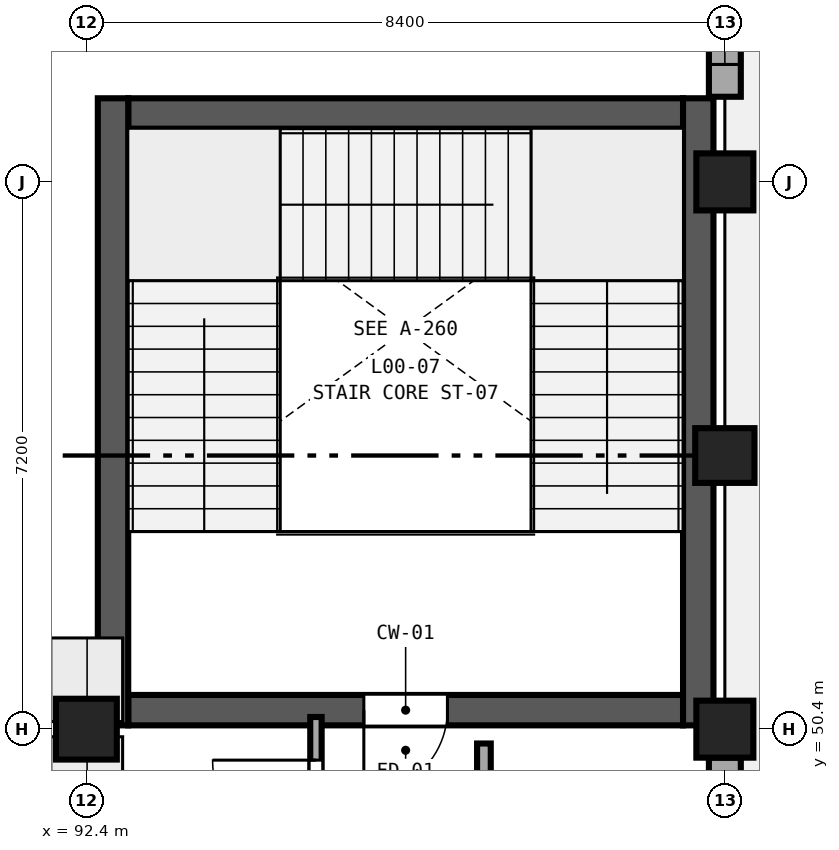
"""IFC4 building model, lengths in metres.
Left out: names, types, materials, properties, quantities, classifications, styles, units other than length and angle.
Written with IfcOpenShell. Run it as: python <this file> out.ifc"""

import sys

from ifc_helpers import new_model, si_unit, direction, frame, frame_2d, origin, origin_2d, place, context, subcontext, project, spatial, rectangle, circle, extrude, element, fill, save


model = new_model("IFC4")
c1 = context("Model", 3, precision=1e-05, world=origin(), true_north=direction((0.0, 1.0)))
c2 = subcontext(c1, "Body", "Model", "MODEL_VIEW")
j1 = project(units=[si_unit("LENGTHUNIT", "METRE"), si_unit("PLANEANGLEUNIT", "RADIAN")], contexts=[c1])
p1 = place(None, origin())
s1 = spatial("IfcSite", under=j1, at=p1, CompositionType="ELEMENT")
p2 = place(p1, origin())
s2 = spatial("IfcBuilding", under=s1, at=p2, CompositionType="ELEMENT")
p3 = place(p2, origin())
s3 = spatial("IfcBuildingStorey", under=s2, at=p3, CompositionType="ELEMENT", Elevation=0.0)
for number, where, z_axis, x_axis in (
    (1, (100.8, 50.4, 0.0), (0.0, 0.0, 1.0), (1.0, 0.0, 0.0)),
    (2, (100.8, 57.6, 0.0), (0.0, 0.0, 1.0), (1.0, 0.0, 0.0)),
):
    element("IfcColumn", number, at=place(p3, frame(where, z_axis=z_axis, x_axis=x_axis)), inside=s3, PredefinedType="COLUMN", context=c2, shape_type="SweptSolid", body=[
        extrude(rectangle(XDim=0.75, YDim=0.75, at=origin_2d()), origin(), (0.0, 0.0, 1.0), 5.4),
    ])
p4 = place(p3, frame((100.8, 54.0, 0.0), z_axis=(0.0, 0.0, 1.0), x_axis=(1.0, 0.0, 0.0)))
e3 = element("IfcColumn", 3, at=p4, inside=s3, PredefinedType="PILASTER", context=c2, shape_type="SweptSolid", body=[
    extrude(rectangle(XDim=0.78, YDim=0.72, at=origin_2d()), origin(), (0.0, 0.0, 1.0), 5.4),
])
p5 = place(p3, frame((92.4, 50.4, 0.0), z_axis=(0.0, 0.0, 1.0), x_axis=(1.0, 0.0, 0.0)))
e4 = element("IfcColumn", 4, at=p5, inside=s3, PredefinedType="COLUMN", context=c2, shape_type="SweptSolid", body=[
    extrude(circle(Radius=0.4, at=origin_2d()), origin(), (0.0, 0.0, 1.0), 5.4),
])
p6 = place(p3, frame((100.8, 50.025, 0.0), z_axis=(0.0, 0.0, 1.0), x_axis=(0.0, -1.0, 0.0)))
e5 = element("IfcWall", 5, at=p6, inside=s3, PredefinedType="SOLIDWALL", context=c2, shape_type="SweptSolid", body=[
    extrude(rectangle(XDim=6.45, YDim=0.42, at=frame_2d((3.225, 0.0))), origin(), (0.0, 0.0, 1.0), 4.53),
])
p7 = place(p6, frame((2.225, 0.0, 0.0)))
e6 = element("IfcOpeningElement", 6, at=p7, cuts=e5, PredefinedType="OPENING", context=c2, shape_type="SweptSolid", body=[
    extrude(rectangle(XDim=2.0, YDim=2.4, at=frame_2d((1.0, 1.2))), frame((0.0, 0.23, 0.0), z_axis=(0.0, -1.0, 0.0), x_axis=(1.0, 0.0, 0.0)), (0.0, 0.0, 1.0), 0.46),
])
p8 = place(p3, frame((100.8, 60.83, 0.0), z_axis=(0.0, 0.0, 1.0), x_axis=(0.0, -1.0, 0.0)))
e7 = element("IfcWall", 7, at=p8, inside=s3, PredefinedType="SOLIDWALL", context=c2, shape_type="SweptSolid", body=[
    extrude(rectangle(XDim=2.11, YDim=0.42, at=frame_2d((1.055, 0.0))), origin(), (0.0, 0.0, 1.0), 4.53),
])
p9 = place(p8, frame((0.425, 0.0, 0.75)))
e8 = element("IfcOpeningElement", 8, at=p9, cuts=e7, PredefinedType="OPENING", context=c2, shape_type="SweptSolid", body=[
    extrude(rectangle(XDim=1.26, YDim=2.44, at=frame_2d((0.63, 1.22))), frame((0.0, 0.23, 0.0), z_axis=(0.0, -1.0, 0.0), x_axis=(1.0, 0.0, 0.0)), (0.0, 0.0, 1.0), 0.46),
])
p10 = place(p3, frame((100.25, 50.65, 0.0), z_axis=(0.0, 0.0, 1.0), x_axis=(-1.0, 0.0, 0.0)))
e9 = element("IfcWall", 9, at=p10, inside=s3, PredefinedType="SHEAR", context=c2, shape_type="SweptSolid", body=[
    extrude(rectangle(XDim=7.3, YDim=0.4, at=frame_2d((3.65, 0.0))), origin(), (0.0, 0.0, 1.0), 5.4),
])
p11 = place(p10, frame((3.1, 0.0, 0.0)))
e10 = element("IfcOpeningElement", 10, at=p11, cuts=e9, PredefinedType="OPENING", context=c2, shape_type="SweptSolid", body=[
    extrude(rectangle(XDim=1.1, YDim=2.2, at=frame_2d((0.55, 1.1))), frame((0.0, 0.22, 0.0), z_axis=(0.0, -1.0, 0.0), x_axis=(1.0, 0.0, 0.0)), (0.0, 0.0, 1.0), 0.44),
])
p12 = place(p3, frame((92.95, 58.5, 0.0), z_axis=(0.0, 0.0, 1.0), x_axis=(1.0, 0.0, 0.0)))
e11 = element("IfcWall", 11, at=p12, inside=s3, PredefinedType="SHEAR", context=c2, shape_type="SweptSolid", body=[
    extrude(rectangle(XDim=7.3, YDim=0.4, at=frame_2d((3.65, 0.0))), origin(), (0.0, 0.0, 1.0), 5.4),
])
for number, where, z_axis, x_axis in (
    (12, (92.75, 58.7, 0.0), (0.0, 0.0, 1.0), (0.0, -1.0, 0.0)),
    (13, (100.45, 50.45, 0.0), (0.0, 0.0, 1.0), (0.0, 1.0, 0.0)),
):
    element("IfcWall", number, at=place(p3, frame(where, z_axis=z_axis, x_axis=x_axis)), inside=s3, PredefinedType="SHEAR", context=c2, shape_type="SweptSolid", body=[
        extrude(rectangle(XDim=8.25, YDim=0.4, at=frame_2d((4.125, 0.0))), origin(), (0.0, 0.0, 1.0), 5.4),
    ])
p13 = place(p3, frame((97.63, 48.065, 0.0), z_axis=(0.0, 0.0, 1.0), x_axis=(0.0, 1.0, 0.0)))
e14 = element("IfcWall", 14, at=p13, inside=s3, PredefinedType="PARTITIONING", context=c2, shape_type="SweptSolid", body=[
    extrude(rectangle(XDim=2.146, YDim=0.18, at=frame_2d((1.073, 0.0))), origin(), (0.0, 0.0, 1.0), 5.08),
])
p14 = place(p13, frame((0.473, 0.0, 0.0)))
e15 = element("IfcOpeningElement", 15, at=p14, cuts=e14, PredefinedType="OPENING", context=c2, shape_type="SweptSolid", body=[
    extrude(rectangle(XDim=1.2, YDim=2.13, at=frame_2d((0.6, 1.065))), frame((0.0, 0.11, 0.0), z_axis=(0.0, -1.0, 0.0), x_axis=(1.0, 0.0, 0.0)), (0.0, 0.0, 1.0), 0.22),
])
p15 = place(p3, frame((95.42, 48.065, 0.0), z_axis=(0.0, 0.0, 1.0), x_axis=(0.0, 1.0, 0.0)))
e16 = element("IfcWall", 16, at=p15, inside=s3, PredefinedType="PARTITIONING", context=c2, shape_type="SweptSolid", body=[
    extrude(rectangle(XDim=2.495, YDim=0.15, at=frame_2d((1.248, 0.0))), origin(), (0.0, 0.0, 1.0), 5.08),
])
p16 = place(p15, frame((0.567, 0.0, 0.0)))
e17 = element("IfcOpeningElement", 17, at=p16, cuts=e16, PredefinedType="OPENING", context=c2, shape_type="SweptSolid", body=[
    extrude(rectangle(XDim=1.36, YDim=2.13, at=frame_2d((0.68, 1.065))), frame((0.0, 0.095, 0.0), z_axis=(0.0, -1.0, 0.0), x_axis=(1.0, 0.0, 0.0)), (0.0, 0.0, 1.0), 0.19),
])
p17 = place(p9, origin())
e18 = element("IfcWindow", 18, at=p17, inside=s3, PartitioningType="TRIPLE_PANEL_VERTICAL", PredefinedType="WINDOW", context=c2, shape_type="SweptSolid", body=[
    extrude(rectangle(XDim=1.26, YDim=2.44, at=frame_2d((0.63, 1.22))), frame((0.0, 0.03, 0.0), z_axis=(0.0, -1.0, 0.0), x_axis=(1.0, 0.0, 0.0)), (0.0, 0.0, 1.0), 0.06),
])
fill(e8, e18)
p18 = place(p11, origin())
e19 = element("IfcDoor", 19, at=p18, inside=s3, OperationType="SINGLE_SWING_RIGHT", PredefinedType="DOOR", context=c2, shape_type="SweptSolid", body=[
    extrude(rectangle(XDim=1.1, YDim=2.2, at=frame_2d((0.55, 1.1))), frame((0.0, 0.025, 0.0), z_axis=(0.0, -1.0, 0.0), x_axis=(1.0, 0.0, 0.0)), (0.0, 0.0, 1.0), 0.05),
])
fill(e10, e19)
p19 = place(p16, origin())
e20 = element("IfcDoor", 20, at=p19, inside=s3, OperationType="SINGLE_SWING_RIGHT", PredefinedType="DOOR", context=c2, shape_type="SweptSolid", body=[
    extrude(rectangle(XDim=1.36, YDim=2.13, at=frame_2d((0.68, 1.065))), frame((0.0, 0.025, 0.0), z_axis=(0.0, -1.0, 0.0), x_axis=(1.0, 0.0, 0.0)), (0.0, 0.0, 1.0), 0.05),
])
fill(e17, e20)
save(model, sys.argv[1])
